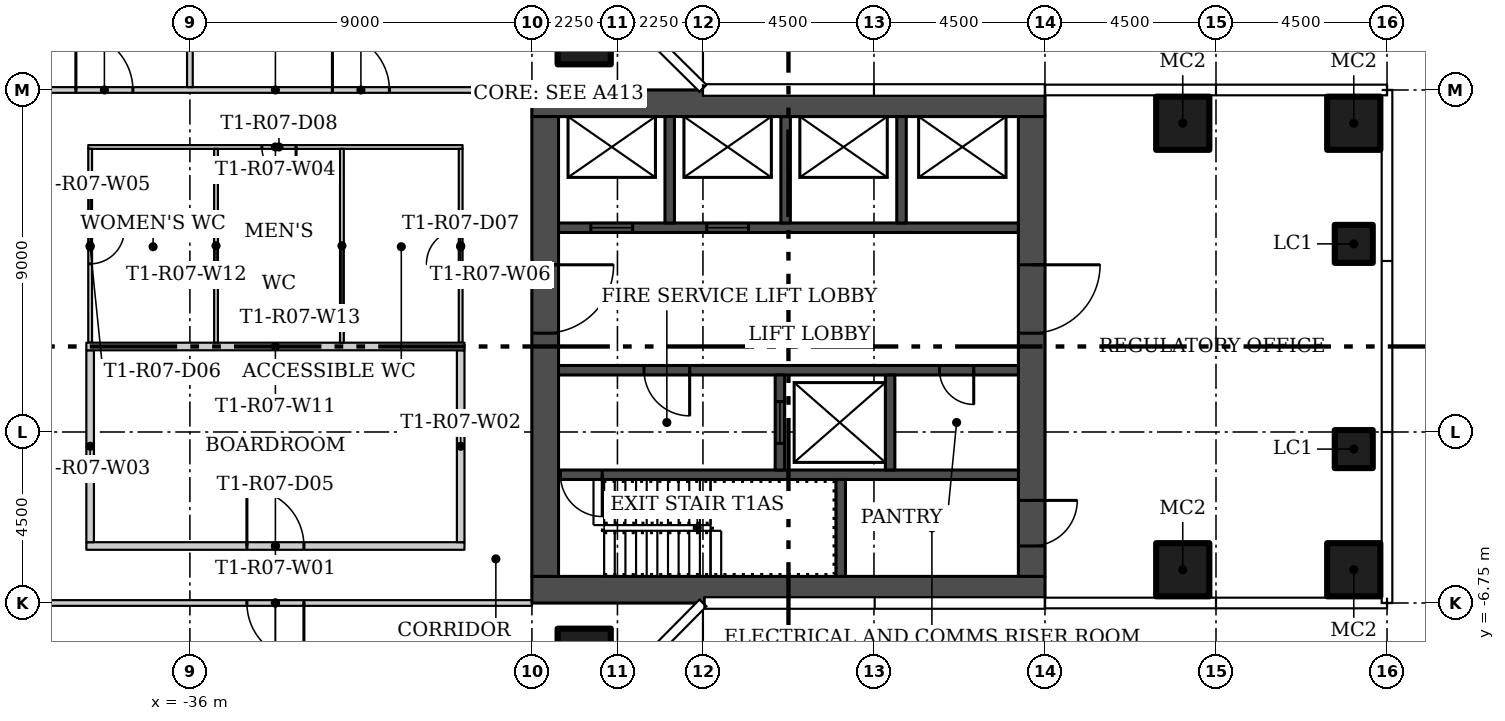
"""IFC4 building model, lengths in metres.
Left out: names, types, materials, properties, quantities, classifications, styles, units other than length and angle.
Written with IfcOpenShell. Run it as: python <this file> out.ifc"""

import sys

from ifc_helpers import new_model, si_unit, direction, frame, frame_2d, origin, origin_2d, place, context, subcontext, project, spatial, rectangle, hollow_rectangle, extrude, element, fill, save


model = new_model("IFC4")
c1 = context("Model", 3, precision=1e-05, world=origin(), true_north=direction((0.0, 1.0)))
c2 = subcontext(c1, "Body", "Model", "MODEL_VIEW")
j1 = project(units=[si_unit("LENGTHUNIT", "METRE"), si_unit("PLANEANGLEUNIT", "RADIAN")], contexts=[c1])
p1 = place(None, origin())
s1 = spatial("IfcSite", under=j1, at=p1, CompositionType="ELEMENT")
p2 = place(p1, origin())
s2 = spatial("IfcBuilding", under=s1, at=p2, CompositionType="ELEMENT")
p3 = place(p2, frame((0.0, 0.0, 73.2)))
s3 = spatial("IfcBuildingStorey", under=s2, at=p3, CompositionType="ELEMENT", Elevation=73.2)
for number, where in (
    (1, (-25.625, 8.125, 0.0)),
    (2, (-25.625, -8.125, 0.0)),
    (3, (-9.875, -5.875, 0.0)),
    (4, (-5.375, -5.875, 0.0)),
    (5, (-9.875, 5.875, 0.0)),
    (6, (-5.375, 5.875, 0.0)),
):
    element("IfcColumn", number, at=place(p3, frame(where)), inside=s3, PredefinedType="COLUMN", context=c2, shape_type="SweptSolid", body=[
        extrude(hollow_rectangle(XDim=1.4, YDim=1.4, WallThickness=0.05, at=origin_2d()), origin(), (0.0, 0.0, 1.0), 3.45),
    ])
for number, where in (
    (7, (-5.375, -2.7, 0.0)),
    (8, (-5.375, 2.7, 0.0)),
):
    element("IfcColumn", number, at=place(p3, frame(where)), inside=s3, PredefinedType="COLUMN", context=c2, shape_type="SweptSolid", body=[
        extrude(hollow_rectangle(XDim=1.0, YDim=1.0, WallThickness=0.04, at=origin_2d()), origin(), (0.0, 0.0, 1.0), 3.45),
    ])
p4 = place(p3, frame((-38.725, -5.25, 0.0)))
e9 = element("IfcWall", 9, at=p4, inside=s3, PredefinedType="PARTITIONING", context=c2, shape_type="SweptSolid", body=[
    extrude(rectangle(XDim=9.95, YDim=0.2, at=frame_2d((4.975, 0.0))), origin(), (0.0, 0.0, 1.0), 3.45),
])
p5 = place(p4, frame((4.225, 0.0, 0.0)))
e10 = element("IfcOpeningElement", 10, at=p5, cuts=e9, PredefinedType="OPENING", context=c2, shape_type="SweptSolid", body=[
    extrude(rectangle(XDim=1.5, YDim=2.4, at=frame_2d((0.75, 1.2))), frame((0.0, 0.11, 0.0), z_axis=(0.0, -1.0, 0.0), x_axis=(1.0, 0.0, 0.0)), (0.0, 0.0, 1.0), 0.22),
])
for number, where, z_axis, x_axis in (
    (11, (-28.875, -5.15, 0.0), (0.0, 0.0, 1.0), (0.0, 1.0, 0.0)),
    (12, (-38.625, -0.1, 0.0), (0.0, 0.0, 1.0), (0.0, -1.0, 0.0)),
):
    element("IfcWall", number, at=place(p3, frame(where, z_axis=z_axis, x_axis=x_axis)), inside=s3, PredefinedType="PARTITIONING", context=c2, shape_type="SweptSolid", body=[
        extrude(rectangle(XDim=5.05, YDim=0.2, at=frame_2d((2.525, 0.0))), origin(), (0.0, 0.0, 1.0), 3.45),
    ])
p6 = place(p3, frame((-28.825, 5.25, 0.0), z_axis=(0.0, 0.0, 1.0), x_axis=(-1.0, 0.0, 0.0)))
e13 = element("IfcWall", 13, at=p6, inside=s3, PredefinedType="PARTITIONING", context=c2, shape_type="SweptSolid", body=[
    extrude(rectangle(XDim=9.85, YDim=0.1, at=frame_2d((4.925, 0.0))), origin(), (0.0, 0.0, 1.0), 3.45),
])
p7 = place(p6, frame((4.381, 0.0, 0.0)))
e14 = element("IfcOpeningElement", 14, at=p7, cuts=e13, PredefinedType="OPENING", context=c2, shape_type="SweptSolid", body=[
    extrude(rectangle(XDim=0.9, YDim=2.1, at=frame_2d((0.45, 1.05))), frame((0.0, 0.06, 0.0), z_axis=(0.0, -1.0, 0.0), x_axis=(1.0, 0.0, 0.0)), (0.0, 0.0, 1.0), 0.12),
])
p8 = place(p3, frame((-38.625, 5.2, 0.0), z_axis=(0.0, 0.0, 1.0), x_axis=(0.0, -1.0, 0.0)))
e15 = element("IfcWall", 15, at=p8, inside=s3, PredefinedType="PARTITIONING", context=c2, shape_type="SweptSolid", body=[
    extrude(rectangle(XDim=5.1, YDim=0.1, at=frame_2d((2.55, 0.0))), origin(), (0.0, 0.0, 1.0), 3.45),
])
p9 = place(p8, frame((2.125, 0.0, 0.0)))
e16 = element("IfcOpeningElement", 16, at=p9, cuts=e15, PredefinedType="OPENING", context=c2, shape_type="SweptSolid", body=[
    extrude(rectangle(XDim=0.9, YDim=2.1, at=frame_2d((0.45, 1.05))), frame((0.0, 0.06, 0.0), z_axis=(0.0, -1.0, 0.0), x_axis=(1.0, 0.0, 0.0)), (0.0, 0.0, 1.0), 0.12),
])
p10 = place(p3, frame((-28.875, 0.1, 0.0), z_axis=(0.0, 0.0, 1.0), x_axis=(0.0, 1.0, 0.0)))
e17 = element("IfcWall", 17, at=p10, inside=s3, PredefinedType="PARTITIONING", context=c2, shape_type="SweptSolid", body=[
    extrude(rectangle(XDim=5.1, YDim=0.1, at=frame_2d((2.55, 0.0))), origin(), (0.0, 0.0, 1.0), 3.45),
])
p11 = place(p10, frame((2.075, 0.0, 0.0)))
e18 = element("IfcOpeningElement", 18, at=p11, cuts=e17, PredefinedType="OPENING", context=c2, shape_type="SweptSolid", body=[
    extrude(rectangle(XDim=0.9, YDim=2.1, at=frame_2d((0.45, 1.05))), frame((0.0, 0.06, 0.0), z_axis=(0.0, -1.0, 0.0), x_axis=(1.0, 0.0, 0.0)), (0.0, 0.0, 1.0), 0.12),
])
p12 = place(p3, frame((-40.5, 6.75, 0.0)))
e19 = element("IfcWall", 19, at=p12, inside=s3, PredefinedType="PARTITIONING", context=c2, shape_type="SweptSolid", body=[
    extrude(rectangle(XDim=13.5, YDim=0.15, at=frame_2d((6.75, 0.0))), origin(), (0.0, 0.0, 1.0), 3.45),
])
p13 = place(p12, frame((1.5, 0.0, 0.0)))
e20 = element("IfcOpeningElement", 20, at=p13, cuts=e19, PredefinedType="OPENING", context=c2, shape_type="SweptSolid", body=[
    extrude(rectangle(XDim=1.5, YDim=2.1, at=frame_2d((0.75, 1.05))), frame((0.0, 0.085, 0.0), z_axis=(0.0, -1.0, 0.0), x_axis=(1.0, 0.0, 0.0)), (0.0, 0.0, 1.0), 0.17),
])
p14 = place(p12, frame((8.25, 0.0, 0.0)))
e21 = element("IfcOpeningElement", 21, at=p14, cuts=e19, PredefinedType="OPENING", context=c2, shape_type="SweptSolid", body=[
    extrude(rectangle(XDim=1.5, YDim=2.1, at=frame_2d((0.75, 1.05))), frame((0.0, 0.085, 0.0), z_axis=(0.0, -1.0, 0.0), x_axis=(1.0, 0.0, 0.0)), (0.0, 0.0, 1.0), 0.17),
])
p15 = place(p3, frame((-27.0, -6.75, 0.0), z_axis=(0.0, 0.0, 1.0), x_axis=(-1.0, 0.0, 0.0)))
e22 = element("IfcWall", 22, at=p15, inside=s3, PredefinedType="PARTITIONING", context=c2, shape_type="SweptSolid", body=[
    extrude(rectangle(XDim=13.5, YDim=0.15, at=frame_2d((6.75, 0.0))), origin(), (0.0, 0.0, 1.0), 3.45),
])
p16 = place(p15, frame((6.0, 0.0, 0.0)))
e23 = element("IfcOpeningElement", 23, at=p16, cuts=e22, PredefinedType="OPENING", context=c2, shape_type="SweptSolid", body=[
    extrude(rectangle(XDim=1.5, YDim=2.1, at=frame_2d((0.75, 1.05))), frame((0.0, 0.085, 0.0), z_axis=(0.0, -1.0, 0.0), x_axis=(1.0, 0.0, 0.0)), (0.0, 0.0, 1.0), 0.17),
])
p17 = place(p3, frame((-28.775, 0.0, 0.0), z_axis=(0.0, 0.0, 1.0), x_axis=(-1.0, 0.0, 0.0)))
e24 = element("IfcWall", 24, at=p17, inside=s3, PredefinedType="PARTITIONING", context=c2, shape_type="SweptSolid", body=[
    extrude(rectangle(XDim=9.95, YDim=0.2, at=frame_2d((4.975, 0.0))), origin(), (0.0, 0.0, 1.0), 3.45),
])
for number, where, z_axis, x_axis in (
    (25, (-35.312, 0.1, 0.0), (0.0, 0.0, 1.0), (0.0, 1.0, 0.0)),
    (26, (-32.0, 0.1, 0.0), (0.0, 0.0, 1.0), (0.0, 1.0, 0.0)),
):
    element("IfcWall", number, at=place(p3, frame(where, z_axis=z_axis, x_axis=x_axis)), inside=s3, PredefinedType="PARTITIONING", context=c2, shape_type="SweptSolid", body=[
        extrude(rectangle(XDim=5.1, YDim=0.1, at=frame_2d((2.55, 0.0))), origin(), (0.0, 0.0, 1.0), 3.45),
    ])
p18 = place(p3, frame((-36.0, 6.825, 0.0), z_axis=(0.0, 0.0, 1.0), x_axis=(0.0, 1.0, 0.0)))
e27 = element("IfcWall", 27, at=p18, inside=s3, PredefinedType="PARTITIONING", context=c2, shape_type="SweptSolid", body=[
    extrude(rectangle(XDim=17.83, YDim=0.15, at=frame_2d((8.915, 0.0))), origin(), (0.0, 0.0, 1.0), 3.45),
])
for number, where in (
    (28, (-27.0, -6.4, 0.0)),
    (29, (-27.0, 6.4, 0.0)),
):
    element("IfcWall", number, at=place(p3, frame(where)), inside=s3, PredefinedType="SHEAR", context=c2, shape_type="SweptSolid", body=[
        extrude(rectangle(XDim=13.5, YDim=0.7, at=frame_2d((6.75, 0.0))), origin(), (0.0, 0.0, 1.0), 3.45),
    ])
p19 = place(p3, frame((-26.65, 6.05, 0.0), z_axis=(0.0, 0.0, 1.0), x_axis=(0.0, -1.0, 0.0)))
e30 = element("IfcWall", 30, at=p19, inside=s3, PredefinedType="SHEAR", context=c2, shape_type="SweptSolid", body=[
    extrude(rectangle(XDim=12.1, YDim=0.7, at=frame_2d((6.05, 0.0))), origin(), (0.0, 0.0, 1.0), 3.45),
])
p20 = place(p19, frame((3.9, 0.0, 0.0)))
e31 = element("IfcOpeningElement", 31, at=p20, cuts=e30, PredefinedType="OPENING", context=c2, shape_type="SweptSolid", body=[
    extrude(rectangle(XDim=1.8, YDim=2.4, at=frame_2d((0.9, 1.2))), frame((0.0, 0.36, 0.0), z_axis=(0.0, -1.0, 0.0), x_axis=(1.0, 0.0, 0.0)), (0.0, 0.0, 1.0), 0.72),
])
p21 = place(p3, frame((-13.85, 6.05, 0.0), z_axis=(0.0, 0.0, 1.0), x_axis=(0.0, -1.0, 0.0)))
e32 = element("IfcWall", 32, at=p21, inside=s3, PredefinedType="SHEAR", context=c2, shape_type="SweptSolid", body=[
    extrude(rectangle(XDim=12.1, YDim=0.7, at=frame_2d((6.05, 0.0))), origin(), (0.0, 0.0, 1.0), 3.45),
])
p22 = place(p21, frame((10.1, 0.0, 0.0)))
e33 = element("IfcOpeningElement", 33, at=p22, cuts=e32, PredefinedType="OPENING", context=c2, shape_type="SweptSolid", body=[
    extrude(rectangle(XDim=1.2, YDim=2.1, at=frame_2d((0.6, 1.05))), frame((0.0, 0.36, 0.0), z_axis=(0.0, -1.0, 0.0), x_axis=(1.0, 0.0, 0.0)), (0.0, 0.0, 1.0), 0.72),
])
p23 = place(p21, frame((3.9, 0.0, 0.0)))
e34 = element("IfcOpeningElement", 34, at=p23, cuts=e32, PredefinedType="OPENING", context=c2, shape_type="SweptSolid", body=[
    extrude(rectangle(XDim=1.8, YDim=2.4, at=frame_2d((0.9, 1.2))), frame((0.0, 0.36, 0.0), z_axis=(0.0, -1.0, 0.0), x_axis=(1.0, 0.0, 0.0)), (0.0, 0.0, 1.0), 0.72),
])
p24 = place(p3, frame((-14.2, -3.375, 0.0), z_axis=(0.0, 0.0, 1.0), x_axis=(-1.0, 0.0, 0.0)))
e35 = element("IfcWall", 35, at=p24, inside=s3, PredefinedType="SHEAR", context=c2, shape_type="SweptSolid", body=[
    extrude(rectangle(XDim=12.1, YDim=0.25, at=frame_2d((6.05, 0.0))), origin(), (0.0, 0.0, 1.0), 3.45),
])
p25 = place(p24, frame((10.95, 0.0, 0.0)))
e36 = element("IfcOpeningElement", 36, at=p25, cuts=e35, PredefinedType="OPENING", context=c2, shape_type="SweptSolid", body=[
    extrude(rectangle(XDim=1.1, YDim=2.1, at=frame_2d((0.55, 1.05))), frame((0.0, 0.135, 0.0), z_axis=(0.0, -1.0, 0.0), x_axis=(1.0, 0.0, 0.0)), (0.0, 0.0, 1.0), 0.27),
])
p26 = place(p3, frame((-18.875, -6.05, 0.0), z_axis=(0.0, 0.0, 1.0), x_axis=(0.0, 1.0, 0.0)))
e37 = element("IfcWall", 37, at=p26, inside=s3, PredefinedType="SHEAR", context=c2, shape_type="SweptSolid", body=[
    extrude(rectangle(XDim=2.55, YDim=0.25, at=frame_2d((1.275, 0.0))), origin(), (0.0, 0.0, 1.0), 3.45),
])
p27 = place(p3, frame((-14.2, -0.625, 0.0), z_axis=(0.0, 0.0, 1.0), x_axis=(-1.0, 0.0, 0.0)))
e38 = element("IfcWall", 38, at=p27, inside=s3, PredefinedType="SHEAR", context=c2, shape_type="SweptSolid", body=[
    extrude(rectangle(XDim=12.1, YDim=0.25, at=frame_2d((6.05, 0.0))), origin(), (0.0, 0.0, 1.0), 3.45),
])
p28 = place(p27, frame((8.65, 0.0, 0.0)))
e39 = element("IfcOpeningElement", 39, at=p28, cuts=e38, PredefinedType="OPENING", context=c2, shape_type="SweptSolid", body=[
    extrude(rectangle(XDim=1.2, YDim=2.1, at=frame_2d((0.6, 1.05))), frame((0.0, 0.135, 0.0), z_axis=(0.0, -1.0, 0.0), x_axis=(1.0, 0.0, 0.0)), (0.0, 0.0, 1.0), 0.27),
])
p29 = place(p27, frame((1.175, 0.0, 0.0)))
e40 = element("IfcOpeningElement", 40, at=p29, cuts=e38, PredefinedType="OPENING", context=c2, shape_type="SweptSolid", body=[
    extrude(rectangle(XDim=0.9, YDim=2.1, at=frame_2d((0.45, 1.05))), frame((0.0, 0.135, 0.0), z_axis=(0.0, -1.0, 0.0), x_axis=(1.0, 0.0, 0.0)), (0.0, 0.0, 1.0), 0.27),
])
p30 = place(p3, frame((-20.475, -3.25, 0.0), z_axis=(0.0, 0.0, 1.0), x_axis=(0.0, 1.0, 0.0)))
e41 = element("IfcWall", 41, at=p30, inside=s3, PredefinedType="SHEAR", context=c2, shape_type="SweptSolid", body=[
    extrude(rectangle(XDim=2.5, YDim=0.25, at=frame_2d((1.25, 0.0))), origin(), (0.0, 0.0, 1.0), 3.45),
])
p31 = place(p30, frame((0.7, 0.0, 0.0)))
e42 = element("IfcOpeningElement", 42, at=p31, cuts=e41, PredefinedType="OPENING", context=c2, shape_type="SweptSolid", body=[
    extrude(rectangle(XDim=1.1, YDim=2.1, at=frame_2d((0.55, 1.05))), frame((0.0, 0.135, 0.0), z_axis=(0.0, -1.0, 0.0), x_axis=(1.0, 0.0, 0.0)), (0.0, 0.0, 1.0), 0.27),
])
p32 = place(p3, frame((-17.575, -3.25, 0.0), z_axis=(0.0, 0.0, 1.0), x_axis=(0.0, 1.0, 0.0)))
e43 = element("IfcWall", 43, at=p32, inside=s3, PredefinedType="SHEAR", context=c2, shape_type="SweptSolid", body=[
    extrude(rectangle(XDim=2.5, YDim=0.25, at=frame_2d((1.25, 0.0))), origin(), (0.0, 0.0, 1.0), 3.45),
])
p33 = place(p3, frame((-26.3, 3.125, 0.0)))
e44 = element("IfcWall", 44, at=p33, inside=s3, PredefinedType="SHEAR", context=c2, shape_type="SweptSolid", body=[
    extrude(rectangle(XDim=12.1, YDim=0.25, at=frame_2d((6.05, 0.0))), origin(), (0.0, 0.0, 1.0), 3.45),
])
p34 = place(p33, frame((0.85, 0.0, 0.0)))
e45 = element("IfcOpeningElement", 45, at=p34, cuts=e44, PredefinedType="OPENING", context=c2, shape_type="SweptSolid", body=[
    extrude(rectangle(XDim=1.1, YDim=2.1, at=frame_2d((0.55, 1.05))), frame((0.0, 0.135, 0.0), z_axis=(0.0, -1.0, 0.0), x_axis=(1.0, 0.0, 0.0)), (0.0, 0.0, 1.0), 0.27),
])
p35 = place(p33, frame((3.9, 0.0, 0.0)))
e46 = element("IfcOpeningElement", 46, at=p35, cuts=e44, PredefinedType="OPENING", context=c2, shape_type="SweptSolid", body=[
    extrude(rectangle(XDim=1.1, YDim=2.1, at=frame_2d((0.55, 1.05))), frame((0.0, 0.135, 0.0), z_axis=(0.0, -1.0, 0.0), x_axis=(1.0, 0.0, 0.0)), (0.0, 0.0, 1.0), 0.27),
])
for number, where, z_axis, x_axis in (
    (47, (-23.375, 3.25, 0.0), (0.0, 0.0, 1.0), (0.0, 1.0, 0.0)),
    (48, (-20.325, 3.25, 0.0), (0.0, 0.0, 1.0), (0.0, 1.0, 0.0)),
    (49, (-17.275, 3.25, 0.0), (0.0, 0.0, 1.0), (0.0, 1.0, 0.0)),
):
    element("IfcWall", number, at=place(p3, frame(where, z_axis=z_axis, x_axis=x_axis)), inside=s3, PredefinedType="SHEAR", context=c2, shape_type="SweptSolid", body=[
        extrude(rectangle(XDim=2.8, YDim=0.25, at=frame_2d((1.4, 0.0))), origin(), (0.0, 0.0, 1.0), 3.45),
    ])
p36 = place(p13, origin())
e50 = element("IfcDoor", 50, at=p36, inside=s3, OperationType="DOUBLE_DOOR_SINGLE_SWING", PredefinedType="DOOR", context=c2, shape_type="SweptSolid", body=[
    extrude(rectangle(XDim=1.5, YDim=2.1, at=frame_2d((0.75, 1.05))), frame((0.0, 0.025, 0.0), z_axis=(0.0, -1.0, 0.0), x_axis=(1.0, 0.0, 0.0)), (0.0, 0.0, 1.0), 0.05),
])
fill(e20, e50)
p37 = place(p14, origin())
e51 = element("IfcDoor", 51, at=p37, inside=s3, OperationType="DOUBLE_DOOR_SINGLE_SWING", PredefinedType="DOOR", context=c2, shape_type="SweptSolid", body=[
    extrude(rectangle(XDim=1.5, YDim=2.1, at=frame_2d((0.75, 1.05))), frame((0.0, 0.025, 0.0), z_axis=(0.0, -1.0, 0.0), x_axis=(1.0, 0.0, 0.0)), (0.0, 0.0, 1.0), 0.05),
])
fill(e21, e51)
p38 = place(p5, origin())
e52 = element("IfcDoor", 52, at=p38, inside=s3, OperationType="DOUBLE_DOOR_SINGLE_SWING", PredefinedType="DOOR", context=c2, shape_type="SweptSolid", body=[
    extrude(rectangle(XDim=1.5, YDim=2.4, at=frame_2d((0.75, 1.2))), frame((0.0, 0.025, 0.0), z_axis=(0.0, -1.0, 0.0), x_axis=(1.0, 0.0, 0.0)), (0.0, 0.0, 1.0), 0.05),
])
fill(e10, e52)
p39 = place(p9, origin())
e53 = element("IfcDoor", 53, at=p39, inside=s3, OperationType="SINGLE_SWING_LEFT", PredefinedType="DOOR", context=c2, shape_type="SweptSolid", body=[
    extrude(rectangle(XDim=0.9, YDim=2.1, at=frame_2d((0.45, 1.05))), frame((0.0, 0.025, 0.0), z_axis=(0.0, -1.0, 0.0), x_axis=(1.0, 0.0, 0.0)), (0.0, 0.0, 1.0), 0.05),
])
fill(e16, e53)
p40 = place(p11, origin())
e54 = element("IfcDoor", 54, at=p40, inside=s3, OperationType="SINGLE_SWING_LEFT", PredefinedType="DOOR", context=c2, shape_type="SweptSolid", body=[
    extrude(rectangle(XDim=0.9, YDim=2.1, at=frame_2d((0.45, 1.05))), frame((0.0, 0.025, 0.0), z_axis=(0.0, -1.0, 0.0), x_axis=(1.0, 0.0, 0.0)), (0.0, 0.0, 1.0), 0.05),
])
fill(e18, e54)
p41 = place(p7, origin())
e55 = element("IfcDoor", 55, at=p41, inside=s3, OperationType="SINGLE_SWING_RIGHT", PredefinedType="DOOR", context=c2, shape_type="SweptSolid", body=[
    extrude(rectangle(XDim=0.9, YDim=2.1, at=frame_2d((0.45, 1.05))), frame((0.0, 0.025, 0.0), z_axis=(0.0, -1.0, 0.0), x_axis=(1.0, 0.0, 0.0)), (0.0, 0.0, 1.0), 0.05),
])
fill(e14, e55)
p42 = place(p16, origin())
e56 = element("IfcDoor", 56, at=p42, inside=s3, OperationType="DOUBLE_DOOR_SINGLE_SWING", PredefinedType="DOOR", context=c2, shape_type="SweptSolid", body=[
    extrude(rectangle(XDim=1.5, YDim=2.1, at=frame_2d((0.75, 1.05))), frame((0.0, 0.025, 0.0), z_axis=(0.0, -1.0, 0.0), x_axis=(1.0, 0.0, 0.0)), (0.0, 0.0, 1.0), 0.05),
])
fill(e23, e56)
p43 = place(p20, origin())
e57 = element("IfcDoor", 57, at=p43, inside=s3, OperationType="DOUBLE_DOOR_SINGLE_SWING", PredefinedType="DOOR", context=c2, shape_type="SweptSolid", body=[
    extrude(rectangle(XDim=1.8, YDim=2.4, at=frame_2d((0.9, 1.2))), frame((0.0, 0.025, 0.0), z_axis=(0.0, -1.0, 0.0), x_axis=(1.0, 0.0, 0.0)), (0.0, 0.0, 1.0), 0.05),
])
fill(e31, e57)
p44 = place(p22, origin())
e58 = element("IfcDoor", 58, at=p44, inside=s3, OperationType="SINGLE_SWING_RIGHT", PredefinedType="DOOR", context=c2, shape_type="SweptSolid", body=[
    extrude(rectangle(XDim=1.2, YDim=2.1, at=frame_2d((0.6, 1.05))), frame((0.0, 0.025, 0.0), z_axis=(0.0, -1.0, 0.0), x_axis=(1.0, 0.0, 0.0)), (0.0, 0.0, 1.0), 0.05),
])
fill(e33, e58)
p45 = place(p23, origin())
e59 = element("IfcDoor", 59, at=p45, inside=s3, OperationType="DOUBLE_DOOR_SINGLE_SWING", PredefinedType="DOOR", context=c2, shape_type="SweptSolid", body=[
    extrude(rectangle(XDim=1.8, YDim=2.4, at=frame_2d((0.9, 1.2))), frame((0.0, 0.025, 0.0), z_axis=(0.0, -1.0, 0.0), x_axis=(1.0, 0.0, 0.0)), (0.0, 0.0, 1.0), 0.05),
])
fill(e34, e59)
p46 = place(p25, origin())
e60 = element("IfcDoor", 60, at=p46, inside=s3, OperationType="SINGLE_SWING_RIGHT", PredefinedType="DOOR", context=c2, shape_type="SweptSolid", body=[
    extrude(rectangle(XDim=1.1, YDim=2.1, at=frame_2d((0.55, 1.05))), frame((0.0, 0.025, 0.0), z_axis=(0.0, -1.0, 0.0), x_axis=(1.0, 0.0, 0.0)), (0.0, 0.0, 1.0), 0.05),
])
fill(e36, e60)
p47 = place(p28, origin())
e61 = element("IfcDoor", 61, at=p47, inside=s3, OperationType="SINGLE_SWING_RIGHT", PredefinedType="DOOR", context=c2, shape_type="SweptSolid", body=[
    extrude(rectangle(XDim=1.2, YDim=2.1, at=frame_2d((0.6, 1.05))), frame((0.0, 0.025, 0.0), z_axis=(0.0, -1.0, 0.0), x_axis=(1.0, 0.0, 0.0)), (0.0, 0.0, 1.0), 0.05),
])
fill(e39, e61)
p48 = place(p29, origin())
e62 = element("IfcDoor", 62, at=p48, inside=s3, OperationType="SINGLE_SWING_LEFT", PredefinedType="DOOR", context=c2, shape_type="SweptSolid", body=[
    extrude(rectangle(XDim=0.9, YDim=2.1, at=frame_2d((0.45, 1.05))), frame((0.0, 0.025, 0.0), z_axis=(0.0, -1.0, 0.0), x_axis=(1.0, 0.0, 0.0)), (0.0, 0.0, 1.0), 0.05),
])
fill(e40, e62)
p49 = place(p31, origin())
e63 = element("IfcDoor", 63, at=p49, inside=s3, OperationType="SLIDING_TO_LEFT", PredefinedType="DOOR", context=c2, shape_type="SweptSolid", body=[
    extrude(rectangle(XDim=1.1, YDim=2.1, at=frame_2d((0.55, 1.05))), frame((0.0, 0.025, 0.0), z_axis=(0.0, -1.0, 0.0), x_axis=(1.0, 0.0, 0.0)), (0.0, 0.0, 1.0), 0.05),
])
fill(e42, e63)
p50 = place(p34, origin())
e64 = element("IfcDoor", 64, at=p50, inside=s3, OperationType="SLIDING_TO_LEFT", PredefinedType="DOOR", context=c2, shape_type="SweptSolid", body=[
    extrude(rectangle(XDim=1.1, YDim=2.1, at=frame_2d((0.55, 1.05))), frame((0.0, 0.025, 0.0), z_axis=(0.0, -1.0, 0.0), x_axis=(1.0, 0.0, 0.0)), (0.0, 0.0, 1.0), 0.05),
])
fill(e45, e64)
p51 = place(p35, origin())
e65 = element("IfcDoor", 65, at=p51, inside=s3, OperationType="SLIDING_TO_LEFT", PredefinedType="DOOR", context=c2, shape_type="SweptSolid", body=[
    extrude(rectangle(XDim=1.1, YDim=2.1, at=frame_2d((0.55, 1.05))), frame((0.0, 0.025, 0.0), z_axis=(0.0, -1.0, 0.0), x_axis=(1.0, 0.0, 0.0)), (0.0, 0.0, 1.0), 0.05),
])
fill(e46, e65)
save(model, sys.argv[1])
